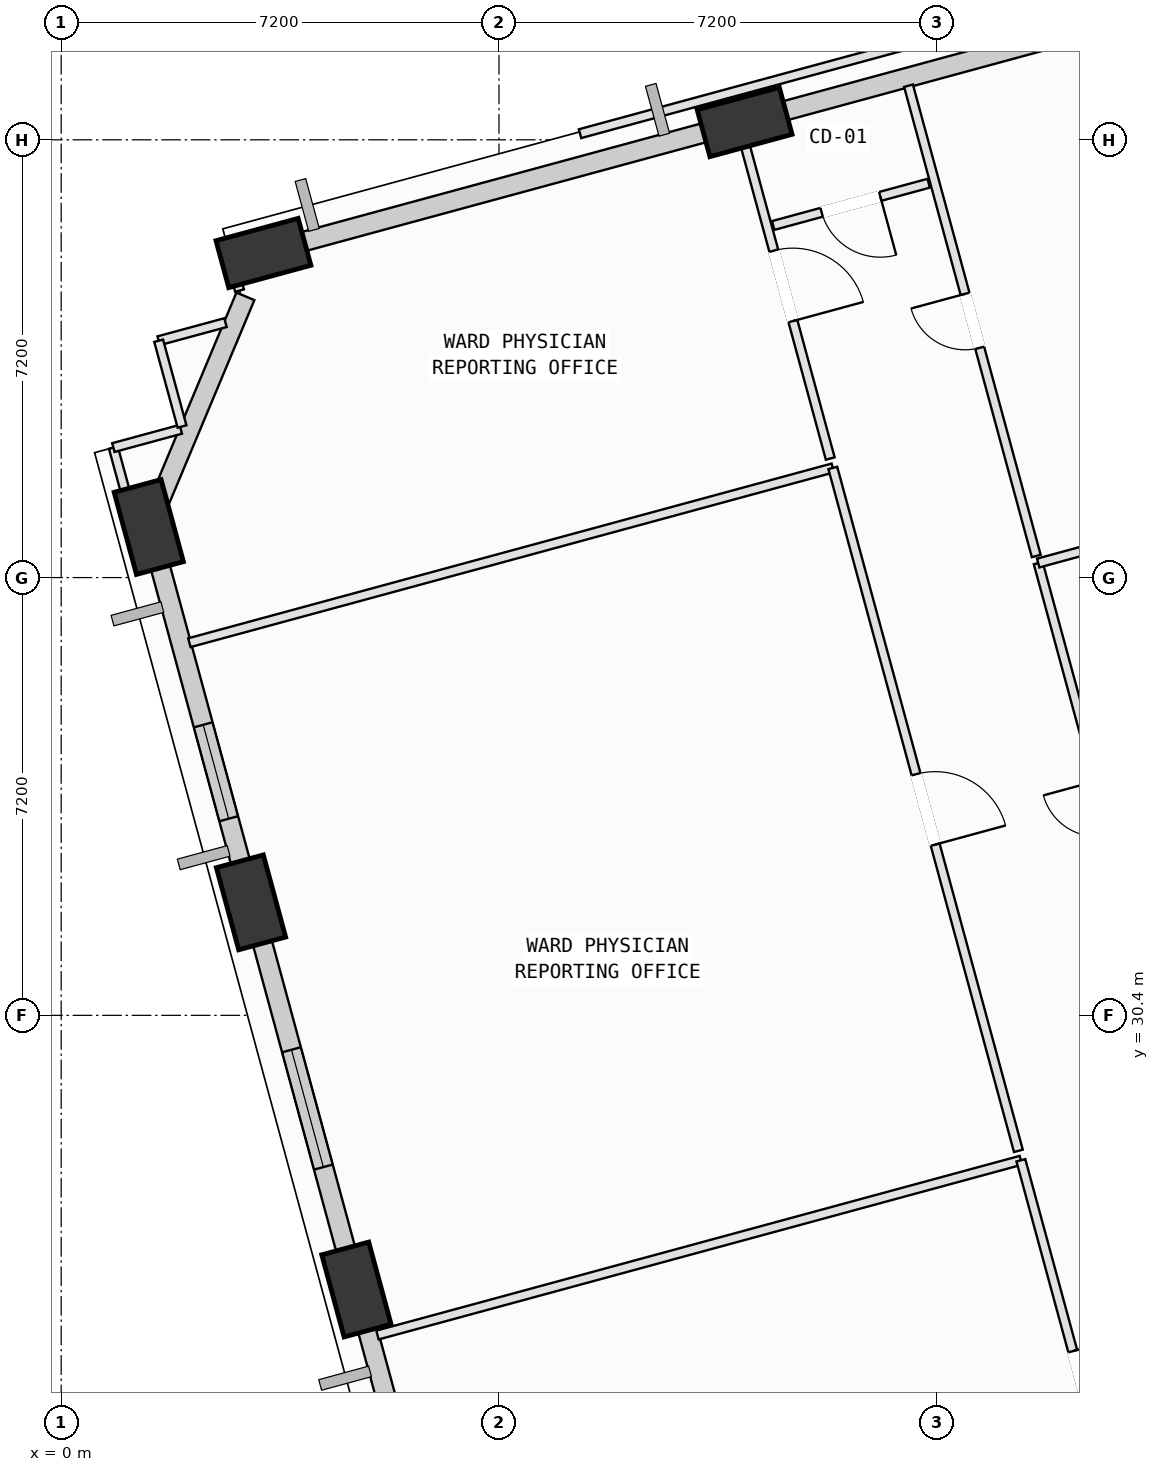
"""IFC4 building model, lengths in metres.
Left out: names, types, materials, properties, quantities, classifications, styles, units other than length and angle.
Written with IfcOpenShell. Run it as: python <this file> out.ifc"""

import sys

from ifc_helpers import new_model, si_unit, direction, frame, frame_2d, origin, origin_2d, place, context, subcontext, project, spatial, rectangle, extrude, element, fill, save


model = new_model("IFC4")
c1 = context("Model", 3, precision=1e-05, world=origin(), true_north=direction((0.0, 1.0)))
c2 = subcontext(c1, "Body", "Model", "MODEL_VIEW")
j1 = project(units=[si_unit("LENGTHUNIT", "METRE"), si_unit("PLANEANGLEUNIT", "RADIAN")], contexts=[c1])
p1 = place(None, origin())
s1 = spatial("IfcSite", under=j1, at=p1, CompositionType="ELEMENT")
p2 = place(p1, origin())
s2 = spatial("IfcBuilding", under=s1, at=p2, CompositionType="ELEMENT")
p3 = place(p2, frame((0.0, 0.0, 88.4)))
s3 = spatial("IfcBuildingStorey", under=s2, at=p3, CompositionType="ELEMENT", Elevation=88.4)
p4 = place(p3, frame((11.24, 45.092, 0.073), z_axis=(-0.082764973125, -0.092639988561, 0.992253894799), x_axis=(0.892975011796, -0.44892624056, 0.032570828123)))
e1 = element("IfcColumn", 1, at=p4, inside=s3, PredefinedType="COLUMN", context=c2, shape_type="SweptSolid", body=[
    extrude(rectangle(XDim=1.4, YDim=0.8, at=origin_2d()), origin(), (0.0, 0.0, 1.0), 3.956),
])
p5 = place(p3, frame((3.326, 42.938, 0.085), z_axis=(-0.073396879193, -0.124756175652, 0.98946894583), x_axis=(0.963298741643, -0.265735361181, 0.037950654368)))
e2 = element("IfcColumn", 2, at=p5, inside=s3, PredefinedType="COLUMN", context=c2, shape_type="SweptSolid", body=[
    extrude(rectangle(XDim=1.4, YDim=0.8, at=origin_2d()), origin(), (0.0, 0.0, 1.0), 3.955),
])
p6 = place(p3, frame((1.441, 38.432, 0.115), z_axis=(-0.054871959567, -0.132327276643, 0.989686091602), x_axis=(0.123637289563, 0.98265105164, 0.138241568785)))
e3 = element("IfcColumn", 3, at=p6, inside=s3, PredefinedType="COLUMN", context=c2, shape_type="SweptSolid", body=[
    extrude(rectangle(XDim=1.4, YDim=0.8, at=origin_2d()), origin(), (0.0, 0.0, 1.0), 3.924),
])
p7 = place(p3, frame((3.122, 32.258, 0.103), z_axis=(-0.029648840383, -0.125494777221, 0.991651151945), x_axis=(-0.035134870554, 0.991605066994, 0.124438466655)))
e4 = element("IfcColumn", 4, at=p7, inside=s3, PredefinedType="COLUMN", context=c2, shape_type="SweptSolid", body=[
    extrude(rectangle(XDim=1.4, YDim=0.8, at=origin_2d()), origin(), (0.0, 0.0, 1.0), 3.928),
])
p8 = place(p3, frame((4.855, 25.891, 0.095), z_axis=(-0.003602216737, -0.118314187664, 0.992969675787), x_axis=(-0.232906733675, 0.965767262988, 0.114228048877)))
e5 = element("IfcColumn", 5, at=p8, inside=s3, PredefinedType="COLUMN", context=c2, shape_type="SweptSolid", body=[
    extrude(rectangle(XDim=1.4, YDim=0.8, at=origin_2d()), origin(), (0.0, 0.0, 1.0), 3.931),
])
p9 = place(p3, frame((11.504, 45.169, 0.0), z_axis=(0.0, 0.0, 1.0), x_axis=(0.965021257098, 0.262171648638, 0.0)))
e6 = element("IfcWall", 6, at=p9, inside=s3, PredefinedType="SOLIDWALL", context=c2, shape_type="SweptSolid", body=[
    extrude(rectangle(XDim=7.231, YDim=0.32, at=frame_2d((3.615, 0.0))), origin(), (0.0, 0.0, 1.0), 3.165),
])
p10 = place(p3, frame((3.567, 43.013, 0.0), z_axis=(0.0, 0.0, 1.0), x_axis=(0.965013691383, 0.262199495505, 0.0)))
e7 = element("IfcWall", 7, at=p10, inside=s3, PredefinedType="SOLIDWALL", context=c2, shape_type="SweptSolid", body=[
    extrude(rectangle(XDim=7.27, YDim=0.32, at=frame_2d((3.635, 0.0))), origin(), (0.0, 0.0, 1.0), 3.165),
])
p11 = place(p3, frame((1.527, 38.638, 0.0), z_axis=(0.0, 0.0, 1.0), x_axis=(0.386330597776, 0.922360379256, 0.0)))
e8 = element("IfcWall", 8, at=p11, inside=s3, PredefinedType="SOLIDWALL", context=c2, shape_type="SweptSolid", body=[
    extrude(rectangle(XDim=3.89, YDim=0.32, at=frame_2d((1.945, 0.0))), origin(), (0.0, 0.0, 1.0), 3.165),
])
p12 = place(p3, frame((3.059, 32.514, 0.0), z_axis=(0.0, 0.0, 1.0), x_axis=(-0.262197133117, 0.965014333254, 0.0)))
e9 = element("IfcWall", 9, at=p12, inside=s3, PredefinedType="SOLIDWALL", context=c2, shape_type="SweptSolid", body=[
    extrude(rectangle(XDim=5.456, YDim=0.32, at=frame_2d((2.728, 0.0))), origin(), (0.0, 0.0, 1.0), 3.165),
])
p13 = place(p12, frame((1.16, 0.0, 0.75)))
e10 = element("IfcOpeningElement", 10, at=p13, cuts=e9, PredefinedType="OPENING", context=c2, shape_type="SweptSolid", body=[
    extrude(rectangle(XDim=1.6, YDim=1.95, at=frame_2d((0.8, 0.975))), frame((0.0, 0.17, 0.0), z_axis=(0.0, -1.0, 0.0), x_axis=(1.0, 0.0, 0.0)), (0.0, 0.0, 1.0), 0.34),
])
p14 = place(p3, frame((4.787, 26.156, 0.0), z_axis=(0.0, 0.0, 1.0), x_axis=(-0.262236334179, 0.965003681359, 0.0)))
e11 = element("IfcWall", 11, at=p14, inside=s3, PredefinedType="SOLIDWALL", context=c2, shape_type="SweptSolid", body=[
    extrude(rectangle(XDim=5.628, YDim=0.32, at=frame_2d((2.814, 0.0))), origin(), (0.0, 0.0, 1.0), 3.165),
])
p15 = place(p14, frame((1.811, 0.0, 0.75)))
e12 = element("IfcOpeningElement", 12, at=p15, cuts=e11, PredefinedType="OPENING", context=c2, shape_type="SweptSolid", body=[
    extrude(rectangle(XDim=2.0, YDim=1.95, at=frame_2d((1.0, 0.975))), frame((0.0, 0.17, 0.0), z_axis=(0.0, -1.0, 0.0), x_axis=(1.0, 0.0, 0.0)), (0.0, 0.0, 1.0), 0.34),
])
p16 = place(p3, frame((6.529, 19.744, 0.0), z_axis=(0.0, 0.0, 1.0), x_axis=(-0.262197887249, 0.965014128354, 0.0)))
e13 = element("IfcWall", 13, at=p16, inside=s3, PredefinedType="SOLIDWALL", context=c2, shape_type="SweptSolid", body=[
    extrude(rectangle(XDim=5.662, YDim=0.32, at=frame_2d((2.831, 0.0))), origin(), (0.0, 0.0, 1.0), 3.165),
])
p17 = place(p16, frame((1.973, 0.0, 0.75)))
e14 = element("IfcOpeningElement", 14, at=p17, cuts=e13, PredefinedType="OPENING", context=c2, shape_type="SweptSolid", body=[
    extrude(rectangle(XDim=1.4, YDim=1.85, at=frame_2d((0.7, 0.925))), frame((0.0, 0.17, 0.0), z_axis=(0.0, -1.0, 0.0), x_axis=(1.0, 0.0, 0.0)), (0.0, 0.0, 1.0), 0.34),
])
p18 = place(p3, frame((5.202, 25.142, 0.0), z_axis=(0.0, 0.0, 1.0), x_axis=(0.965034618354, 0.262122462558, 0.0)))
e15 = element("IfcWall", 15, at=p18, inside=s3, PredefinedType="PARTITIONING", context=c2, shape_type="SweptSolid", body=[
    extrude(rectangle(XDim=10.964, YDim=0.15, at=frame_2d((5.482, 0.0))), origin(), (0.0, 0.0, 1.0), 3.78),
])
p19 = place(p3, frame((15.783, 28.016, 0.0), z_axis=(0.0, 0.0, 1.0), x_axis=(0.26227015523, -0.964994489972, 0.0)))
e16 = element("IfcWall", 16, at=p19, inside=s3, PredefinedType="PARTITIONING", context=c2, shape_type="SweptSolid", body=[
    extrude(rectangle(XDim=7.706, YDim=0.15, at=frame_2d((3.853, 0.0))), origin(), (0.0, 0.0, 1.0), 3.78),
])
p20 = place(p19, frame((3.253, 0.0, 0.0)))
e17 = element("IfcOpeningElement", 17, at=p20, cuts=e16, PredefinedType="OPENING", context=c2, shape_type="SweptSolid", body=[
    extrude(rectangle(XDim=1.2, YDim=2.15, at=frame_2d((0.6, 1.075))), frame((0.0, 0.085, 0.0), z_axis=(0.0, -1.0, 0.0), x_axis=(1.0, 0.0, 0.0)), (0.0, 0.0, 1.0), 0.17),
])
p21 = place(p3, frame((2.108, 36.529, 0.0), z_axis=(0.0, 0.0, 1.0), x_axis=(0.965040737157, 0.262099934427, 0.0)))
e18 = element("IfcWall", 18, at=p21, inside=s3, PredefinedType="PARTITIONING", context=c2, shape_type="SweptSolid", body=[
    extrude(rectangle(XDim=10.965, YDim=0.15, at=frame_2d((5.483, 0.0))), origin(), (0.0, 0.0, 1.0), 3.78),
])
p22 = place(p3, frame((12.69, 39.403, 0.0), z_axis=(0.0, 0.0, 1.0), x_axis=(0.262212125461, -0.965010259666, 0.0)))
e19 = element("IfcWall", 19, at=p22, inside=s3, PredefinedType="PARTITIONING", context=c2, shape_type="SweptSolid", body=[
    extrude(rectangle(XDim=11.639, YDim=0.15, at=frame_2d((5.82, 0.0))), origin(), (0.0, 0.0, 1.0), 3.78),
])
p23 = place(p22, frame((5.219, 0.0, 0.0)))
e20 = element("IfcOpeningElement", 20, at=p23, cuts=e19, PredefinedType="OPENING", context=c2, shape_type="SweptSolid", body=[
    extrude(rectangle(XDim=1.2, YDim=2.15, at=frame_2d((0.6, 1.075))), frame((0.0, 0.085, 0.0), z_axis=(0.0, -1.0, 0.0), x_axis=(1.0, 0.0, 0.0)), (0.0, 0.0, 1.0), 0.17),
])
p24 = place(p3, frame((4.808, 25.2, 0.0), z_axis=(0.0, 0.0, 1.0), x_axis=(-0.261915642478, 0.965090770977, 0.0)))
e21 = element("IfcWall", 21, at=p24, inside=s3, PredefinedType="PARTITIONING", context=c2, shape_type="SweptSolid", body=[
    extrude(rectangle(XDim=0.928, YDim=0.15, at=frame_2d((0.464, 0.0))), origin(), (0.0, 0.0, 1.0), 3.165),
])
p25 = place(p3, frame((3.089, 31.527, 0.0), z_axis=(0.0, 0.0, 1.0), x_axis=(-0.26251526429, 0.964927839797, 0.0)))
e22 = element("IfcWall", 22, at=p25, inside=s3, PredefinedType="PARTITIONING", context=c2, shape_type="SweptSolid", body=[
    extrude(rectangle(XDim=0.961, YDim=0.15, at=frame_2d((0.48, 0.0))), origin(), (0.0, 0.0, 1.0), 3.165),
])
p26 = place(p3, frame((1.603, 41.495, 0.0), z_axis=(0.0, 0.0, 1.0), x_axis=(0.965173371919, 0.261611089478, 0.0)))
e23 = element("IfcWall", 23, at=p26, inside=s3, PredefinedType="PARTITIONING", context=c2, shape_type="SweptSolid", body=[
    extrude(rectangle(XDim=1.138, YDim=0.15, at=frame_2d((0.569, 0.0))), origin(), (0.0, 0.0, 1.0), 3.78),
])
p27 = place(p3, frame((2.933, 42.32, 0.0), z_axis=(0.0, 0.0, 1.0), x_axis=(-0.261796029019, 0.965123224873, 0.0)))
e24 = element("IfcWall", 24, at=p27, inside=s3, PredefinedType="PARTITIONING", context=c2, shape_type="SweptSolid", body=[
    extrude(rectangle(XDim=0.672, YDim=0.15, at=frame_2d((0.336, 0.0))), origin(), (0.0, 0.0, 1.0), 2.765),
])
p28 = place(p3, frame((2.757, 42.969, 0.0), z_axis=(0.0, 0.0, 1.0), x_axis=(0.964955470626, 0.26241368049, 0.0)))
e25 = element("IfcWall", 25, at=p28, inside=s3, PredefinedType="PARTITIONING", context=c2, shape_type="SweptSolid", body=[
    extrude(rectangle(XDim=0.793, YDim=0.15, at=frame_2d((0.396, 0.0))), origin(), (0.0, 0.0, 1.0), 3.78),
])
p29 = place(p3, frame((10.538, 45.083, 0.0), z_axis=(0.0, 0.0, 1.0), x_axis=(0.965003184942, 0.262238160938, 0.0)))
e26 = element("IfcWall", 26, at=p29, inside=s3, PredefinedType="PARTITIONING", context=c2, shape_type="SweptSolid", body=[
    extrude(rectangle(XDim=0.587, YDim=0.15, at=frame_2d((0.294, 0.0))), origin(), (0.0, 0.0, 1.0), 3.78),
])
p30 = place(p3, frame((11.105, 45.237, 0.0), z_axis=(0.0, 0.0, 1.0), x_axis=(0.262194053335, -0.965015170034, 0.0)))
e27 = element("IfcWall", 27, at=p30, inside=s3, PredefinedType="PARTITIONING", context=c2, shape_type="SweptSolid", body=[
    extrude(rectangle(XDim=5.885, YDim=0.15, at=frame_2d((2.942, 0.0))), origin(), (0.0, 0.0, 1.0), 2.765),
])
p31 = place(p30, frame((2.342, 0.0, 0.0)))
e28 = element("IfcOpeningElement", 28, at=p31, cuts=e27, PredefinedType="OPENING", context=c2, shape_type="SweptSolid", body=[
    extrude(rectangle(XDim=1.2, YDim=2.15, at=frame_2d((0.6, 1.075))), frame((0.0, 0.085, 0.0), z_axis=(0.0, -1.0, 0.0), x_axis=(1.0, 0.0, 0.0)), (0.0, 0.0, 1.0), 0.17),
])
p32 = place(p3, frame((1.407, 37.719, 0.0), z_axis=(0.0, 0.0, 1.0), x_axis=(-0.262416350704, 0.964954744474, 0.0)))
e29 = element("IfcWall", 29, at=p32, inside=s3, PredefinedType="PARTITIONING", context=c2, shape_type="SweptSolid", body=[
    extrude(rectangle(XDim=2.092, YDim=0.15, at=frame_2d((1.046, 0.0))), origin(), (0.0, 0.0, 1.0), 3.165),
])
p33 = place(p3, frame((0.858, 39.738, 0.0), z_axis=(0.0, 0.0, 1.0), x_axis=(0.965086644791, 0.261930845923, 0.0)))
e30 = element("IfcWall", 30, at=p33, inside=s3, PredefinedType="PARTITIONING", context=c2, shape_type="SweptSolid", body=[
    extrude(rectangle(XDim=1.149, YDim=0.15, at=frame_2d((0.575, 0.0))), origin(), (0.0, 0.0, 1.0), 3.78),
])
p34 = place(p3, frame((1.987, 40.085, 0.0), z_axis=(0.0, 0.0, 1.0), x_axis=(-0.262764020713, 0.964860129459, 0.0)))
e31 = element("IfcWall", 31, at=p34, inside=s3, PredefinedType="PARTITIONING", context=c2, shape_type="SweptSolid", body=[
    extrude(rectangle(XDim=1.461, YDim=0.15, at=frame_2d((0.731, 0.0))), origin(), (0.0, 0.0, 1.0), 3.78),
])
p35 = place(p3, frame((18.255, 29.791, 0.0), z_axis=(0.0, 0.0, 1.0), x_axis=(-0.262205746142, 0.965011993029, 0.0)))
e32 = element("IfcWall", 32, at=p35, inside=s3, PredefinedType="PARTITIONING", context=c2, shape_type="SweptSolid", body=[
    extrude(rectangle(XDim=8.34, YDim=0.15, at=frame_2d((4.17, 0.0))), origin(), (0.0, 0.0, 1.0), 3.78),
])
p36 = place(p35, frame((3.71, 0.0, 0.0)))
e33 = element("IfcOpeningElement", 33, at=p36, cuts=e32, PredefinedType="OPENING", context=c2, shape_type="SweptSolid", body=[
    extrude(rectangle(XDim=0.92, YDim=2.1, at=frame_2d((0.46, 1.05))), frame((0.0, 0.085, 0.0), z_axis=(0.0, -1.0, 0.0), x_axis=(1.0, 0.0, 0.0)), (0.0, 0.0, 1.0), 0.17),
])
p37 = place(p3, frame((16.068, 37.839, 0.0), z_axis=(0.0, 0.0, 1.0), x_axis=(0.965008131897, 0.262219956093, 0.0)))
e34 = element("IfcWall", 34, at=p37, inside=s3, PredefinedType="PARTITIONING", context=c2, shape_type="SweptSolid", body=[
    extrude(rectangle(XDim=6.814, YDim=0.15, at=frame_2d((3.407, 0.0))), origin(), (0.0, 0.0, 1.0), 3.78),
])
p38 = place(p3, frame((16.036, 37.955, 0.0), z_axis=(0.0, 0.0, 1.0), x_axis=(-0.262109500246, 0.965038139081, 0.0)))
e35 = element("IfcWall", 35, at=p38, inside=s3, PredefinedType="PARTITIONING", context=c2, shape_type="SweptSolid", body=[
    extrude(rectangle(XDim=8.015, YDim=0.15, at=frame_2d((4.008, 0.0))), origin(), (0.0, 0.0, 1.0), 3.78),
])
p39 = place(p38, frame((3.548, 0.0, 0.0)))
e36 = element("IfcOpeningElement", 36, at=p39, cuts=e35, PredefinedType="OPENING", context=c2, shape_type="SweptSolid", body=[
    extrude(rectangle(XDim=0.92, YDim=2.1, at=frame_2d((0.46, 1.05))), frame((0.0, 0.085, 0.0), z_axis=(0.0, -1.0, 0.0), x_axis=(1.0, 0.0, 0.0)), (0.0, 0.0, 1.0), 0.17),
])
p40 = place(p3, frame((14.267, 44.086, 0.0), z_axis=(0.0, 0.0, 1.0), x_axis=(-0.965010032649, -0.262212960943, 0.0)))
e37 = element("IfcWall", 37, at=p40, inside=s3, PredefinedType="PARTITIONING", context=c2, shape_type="SweptSolid", body=[
    extrude(rectangle(XDim=2.65, YDim=0.15, at=frame_2d((1.325, 0.0))), origin(), (0.0, 0.0, 1.0), 3.78),
])
p41 = place(p40, frame((0.825, 0.0, 0.0)))
e38 = element("IfcOpeningElement", 38, at=p41, cuts=e37, PredefinedType="OPENING", context=c2, shape_type="SweptSolid", body=[
    extrude(rectangle(XDim=1.0, YDim=2.12, at=frame_2d((0.5, 1.06))), frame((0.0, 0.085, 0.0), z_axis=(0.0, -1.0, 0.0), x_axis=(1.0, 0.0, 0.0)), (0.0, 0.0, 1.0), 0.17),
])
p42 = place(p3, frame((8.533, 44.901, 0.0), z_axis=(0.0, 0.0, 1.0), x_axis=(0.965008606139, 0.262218210804, 0.0)))
e39 = element("IfcWall", 39, at=p42, inside=s3, PredefinedType="PARTITIONING", context=c2, shape_type="SweptSolid", body=[
    extrude(rectangle(XDim=6.64, YDim=0.15, at=frame_2d((3.32, 0.0))), origin(), (0.0, 0.0, 1.0), 3.78),
])
p43 = place(p13, origin())
e40 = element("IfcWindow", 40, at=p43, inside=s3, PartitioningType="SINGLE_PANEL", PredefinedType="WINDOW", context=c2, shape_type="SweptSolid", body=[
    extrude(rectangle(XDim=1.6, YDim=1.95, at=frame_2d((0.8, 0.975))), frame((0.0, 0.03, 0.0), z_axis=(0.0, -1.0, 0.0), x_axis=(1.0, 0.0, 0.0)), (0.0, 0.0, 1.0), 0.06),
])
fill(e10, e40)
p44 = place(p15, origin())
e41 = element("IfcWindow", 41, at=p44, inside=s3, PartitioningType="SINGLE_PANEL", PredefinedType="WINDOW", context=c2, shape_type="SweptSolid", body=[
    extrude(rectangle(XDim=2.0, YDim=1.95, at=frame_2d((1.0, 0.975))), frame((0.0, 0.03, 0.0), z_axis=(0.0, -1.0, 0.0), x_axis=(1.0, 0.0, 0.0)), (0.0, 0.0, 1.0), 0.06),
])
fill(e12, e41)
p45 = place(p20, origin())
e42 = element("IfcDoor", 42, at=p45, inside=s3, OperationType="SINGLE_SWING_LEFT", PredefinedType="DOOR", context=c2, shape_type="SweptSolid", body=[
    extrude(rectangle(XDim=1.2, YDim=2.15, at=frame_2d((0.6, 1.075))), frame((0.0, 0.025, 0.0), z_axis=(0.0, -1.0, 0.0), x_axis=(1.0, 0.0, 0.0)), (0.0, 0.0, 1.0), 0.05),
])
fill(e17, e42)
p46 = place(p23, origin())
e43 = element("IfcDoor", 43, at=p46, inside=s3, OperationType="SINGLE_SWING_RIGHT", PredefinedType="DOOR", context=c2, shape_type="SweptSolid", body=[
    extrude(rectangle(XDim=1.2, YDim=2.15, at=frame_2d((0.6, 1.075))), frame((0.0, 0.025, 0.0), z_axis=(0.0, -1.0, 0.0), x_axis=(1.0, 0.0, 0.0)), (0.0, 0.0, 1.0), 0.05),
])
fill(e20, e43)
p47 = place(p31, origin())
e44 = element("IfcDoor", 44, at=p47, inside=s3, OperationType="SINGLE_SWING_RIGHT", PredefinedType="DOOR", context=c2, shape_type="SweptSolid", body=[
    extrude(rectangle(XDim=1.2, YDim=2.15, at=frame_2d((0.6, 1.075))), frame((0.0, 0.025, 0.0), z_axis=(0.0, -1.0, 0.0), x_axis=(1.0, 0.0, 0.0)), (0.0, 0.0, 1.0), 0.05),
])
fill(e28, e44)
p48 = place(p39, origin())
e45 = element("IfcDoor", 45, at=p48, inside=s3, OperationType="SINGLE_SWING_RIGHT", PredefinedType="DOOR", context=c2, shape_type="SweptSolid", body=[
    extrude(rectangle(XDim=0.92, YDim=2.1, at=frame_2d((0.46, 1.05))), frame((0.0, 0.025, 0.0), z_axis=(0.0, -1.0, 0.0), x_axis=(1.0, 0.0, 0.0)), (0.0, 0.0, 1.0), 0.05),
])
fill(e36, e45)
p49 = place(p41, origin())
e46 = element("IfcDoor", 46, at=p49, inside=s3, OperationType="SINGLE_SWING_LEFT", PredefinedType="DOOR", context=c2, shape_type="SweptSolid", body=[
    extrude(rectangle(XDim=1.0, YDim=2.12, at=frame_2d((0.5, 1.06))), frame((0.0, 0.025, 0.0), z_axis=(0.0, -1.0, 0.0), x_axis=(1.0, 0.0, 0.0)), (0.0, 0.0, 1.0), 0.05),
])
fill(e38, e46)
save(model, sys.argv[1])
